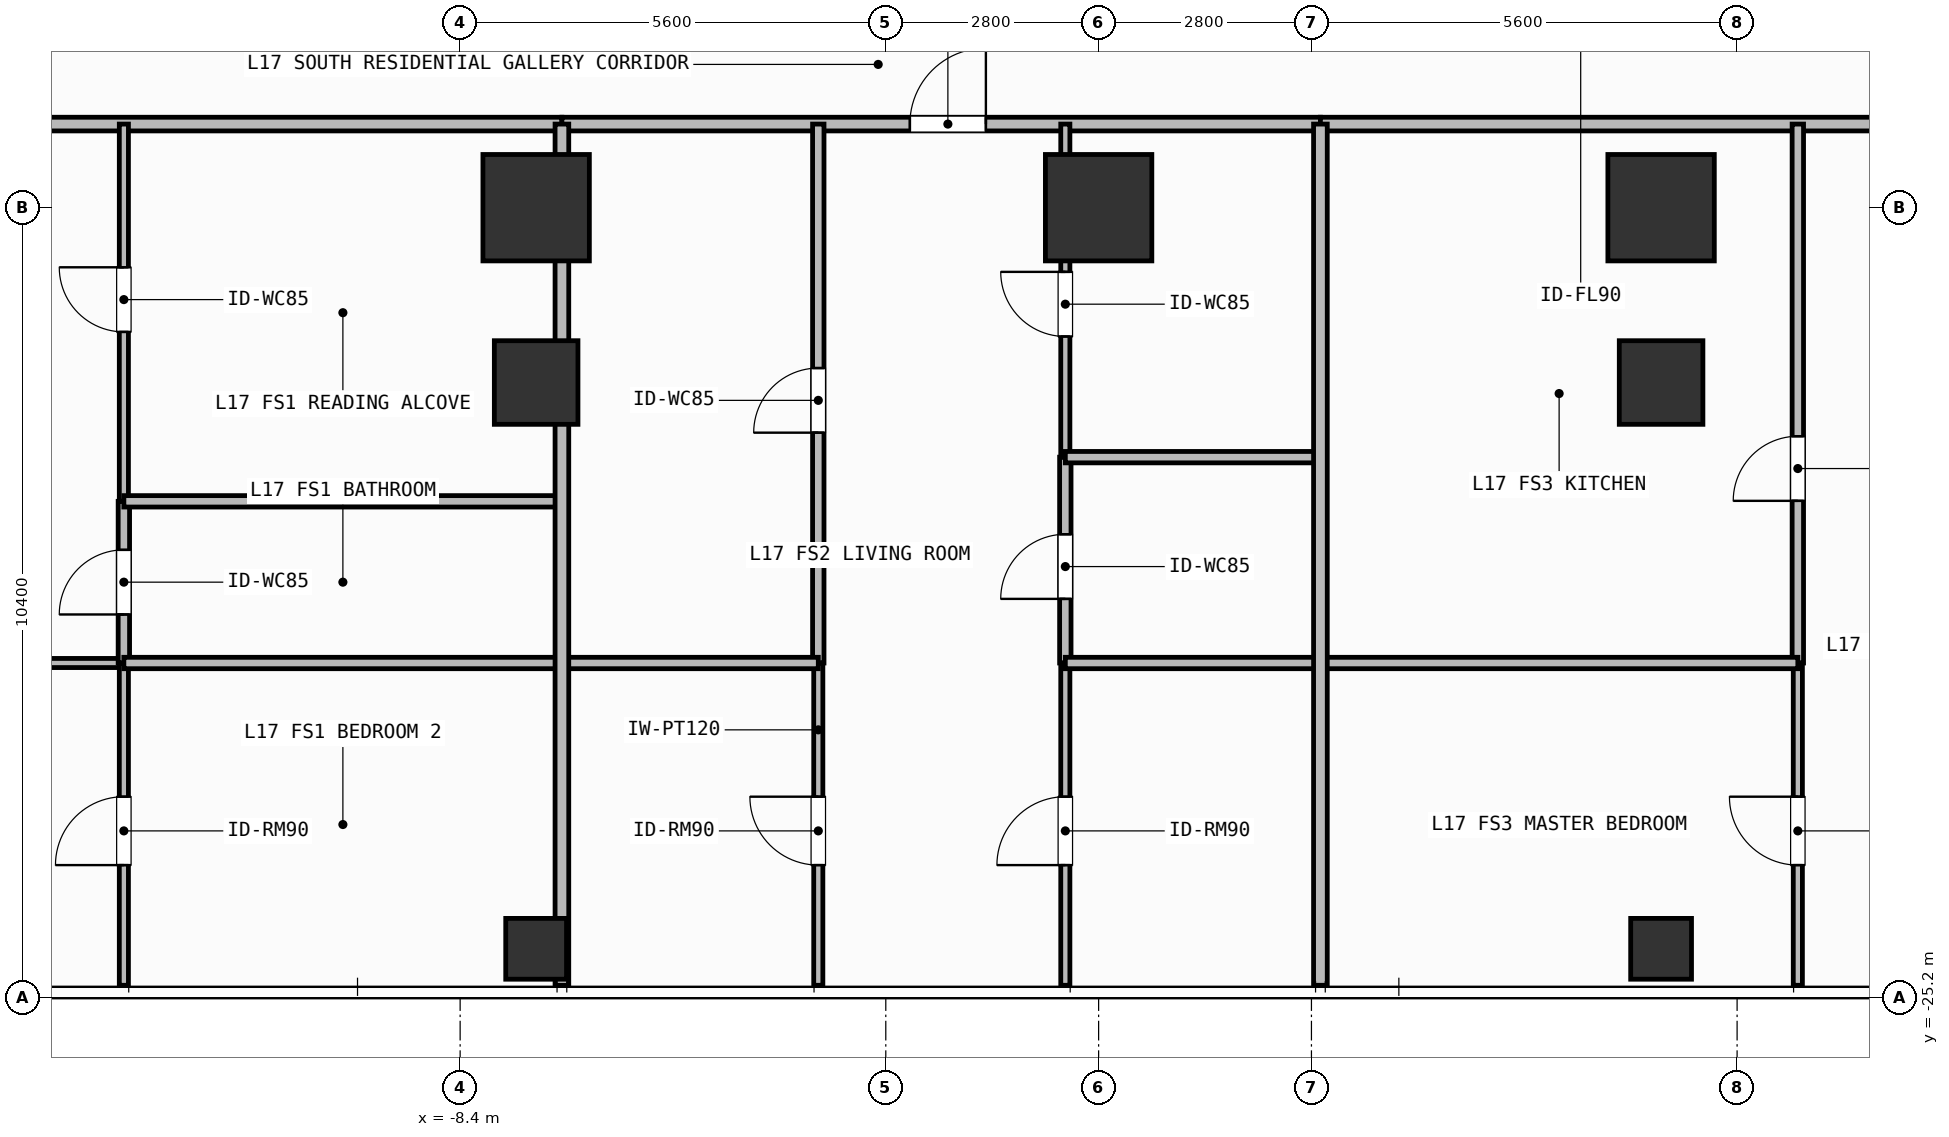
"""IFC4 building model, lengths in metres.
Left out: names, types, materials, properties, quantities, classifications, styles, units other than length and angle.
Written with IfcOpenShell. Run it as: python <this file> out.ifc"""

import sys

from ifc_helpers import new_model, si_unit, direction, frame, frame_2d, origin, origin_2d, place, context, subcontext, project, spatial, rectangle, hollow_rectangle, extrude, element, fill, save


model = new_model("IFC4")
c1 = context("Model", 3, precision=1e-05, world=origin(), true_north=direction((0.0, 1.0)))
c2 = subcontext(c1, "Body", "Model", "MODEL_VIEW")
j1 = project(units=[si_unit("LENGTHUNIT", "METRE"), si_unit("PLANEANGLEUNIT", "RADIAN")], contexts=[c1])
p1 = place(None, origin())
s1 = spatial("IfcSite", under=j1, at=p1, CompositionType="ELEMENT")
p2 = place(p1, origin())
s2 = spatial("IfcBuilding", under=s1, at=p2, CompositionType="ELEMENT")
p3 = place(p2, frame((0.0, 0.0, 65.7)))
s3 = spatial("IfcBuildingStorey", under=s2, at=p3, CompositionType="ELEMENT", Elevation=65.7)
for number, where, z_axis, x_axis in (
    (1, (-7.4, -14.8, 0.0), (0.0, 0.0, 1.0), (1.0, 0.0, 0.0)),
    (2, (0.0, -14.8, 0.0), (0.0, 0.0, 1.0), (1.0, 0.0, 0.0)),
    (3, (7.4, -14.8, 0.0), (0.0, 0.0, 1.0), (1.0, 0.0, 0.0)),
):
    element("IfcColumn", number, at=place(p3, frame(where, z_axis=z_axis, x_axis=x_axis)), inside=s3, PredefinedType="COLUMN", context=c2, shape_type="SweptSolid", body=[
        extrude(rectangle(XDim=1.4, YDim=1.4, at=origin_2d()), origin(), (0.0, 0.0, 1.0), 3.9),
    ])
for number, where, z_axis, x_axis in (
    (4, (-7.4, -17.1, 0.0), (0.0, 0.0, 1.0), (1.0, 0.0, 0.0)),
    (5, (7.4, -17.1, 0.0), (0.0, 0.0, 1.0), (1.0, 0.0, 0.0)),
):
    element("IfcColumn", number, at=place(p3, frame(where, z_axis=z_axis, x_axis=x_axis)), inside=s3, PredefinedType="COLUMN", context=c2, shape_type="SweptSolid", body=[
        extrude(rectangle(XDim=1.1, YDim=1.1, at=origin_2d()), origin(), (0.0, 0.0, 1.0), 3.9),
    ])
for number, where, z_axis, x_axis in (
    (6, (-7.4, -24.55, 0.0), (0.0, 0.0, 1.0), (1.0, 0.0, 0.0)),
    (7, (7.4, -24.55, 0.0), (0.0, 0.0, 1.0), (1.0, 0.0, 0.0)),
):
    element("IfcColumn", number, at=place(p3, frame(where, z_axis=z_axis, x_axis=x_axis)), inside=s3, PredefinedType="COLUMN", context=c2, shape_type="SweptSolid", body=[
        extrude(hollow_rectangle(XDim=0.8, YDim=0.8, WallThickness=0.036, at=origin_2d()), origin(), (0.0, 0.0, 1.0), 3.9),
    ])
p4 = place(p3, frame((-24.42, -13.7, 0.0), z_axis=(0.0, 0.0, 1.0), x_axis=(1.0, 0.0, 0.0)))
e8 = element("IfcWall", 8, at=p4, inside=s3, PredefinedType="PARTITIONING", context=c2, shape_type="SweptSolid", body=[
    extrude(rectangle(XDim=17.359, YDim=0.18, at=frame_2d((8.679, 0.0))), origin(), (0.0, 0.0, 1.0), 3.68),
])
p5 = place(p4, frame((7.288, 0.0, 0.0)))
e9 = element("IfcOpeningElement", 9, at=p5, cuts=e8, PredefinedType="OPENING", context=c2, shape_type="SweptSolid", body=[
    extrude(rectangle(XDim=1.0, YDim=2.2, at=frame_2d((0.5, 1.1))), frame((0.0, 0.1, 0.0), z_axis=(0.0, -1.0, 0.0), x_axis=(1.0, 0.0, 0.0)), (0.0, 0.0, 1.0), 0.2),
])
p6 = place(p3, frame((-20.783, -20.79, 0.0), z_axis=(0.0, 0.0, 1.0), x_axis=(1.0, 0.0, 0.0)))
e10 = element("IfcWall", 10, at=p6, inside=s3, PredefinedType="PARTITIONING", context=c2, shape_type="SweptSolid", body=[
    extrude(rectangle(XDim=7.959, YDim=0.12, at=frame_2d((3.979, 0.0))), origin(), (0.0, 0.0, 1.0), 3.68),
])
p7 = place(p6, frame((3.53, 0.0, 0.0)))
e11 = element("IfcOpeningElement", 11, at=p7, cuts=e10, PredefinedType="OPENING", context=c2, shape_type="SweptSolid", body=[
    extrude(rectangle(XDim=0.9, YDim=2.1, at=frame_2d((0.45, 1.05))), frame((0.0, 0.07, 0.0), z_axis=(0.0, -1.0, 0.0), x_axis=(1.0, 0.0, 0.0)), (0.0, 0.0, 1.0), 0.14),
])
p8 = place(p3, frame((-12.824, -20.79, 0.0), z_axis=(0.0, 0.0, 1.0), x_axis=(0.0, 1.0, 0.0)))
e12 = element("IfcWall", 12, at=p8, inside=s3, PredefinedType="PARTITIONING", context=c2, shape_type="SweptSolid", body=[
    extrude(rectangle(XDim=2.127, YDim=0.15, at=frame_2d((1.063, 0.0))), origin(), (0.0, 0.0, 1.0), 3.68),
])
p9 = place(p8, frame((0.638, 0.0, 0.0)))
e13 = element("IfcOpeningElement", 13, at=p9, cuts=e12, PredefinedType="OPENING", context=c2, shape_type="SweptSolid", body=[
    extrude(rectangle(XDim=0.85, YDim=2.1, at=frame_2d((0.425, 1.05))), frame((0.0, 0.085, 0.0), z_axis=(0.0, -1.0, 0.0), x_axis=(1.0, 0.0, 0.0)), (0.0, 0.0, 1.0), 0.17),
])
p10 = place(p3, frame((-12.824, -18.663, 0.0), z_axis=(0.0, 0.0, 1.0), x_axis=(0.0, 1.0, 0.0)))
e14 = element("IfcWall", 14, at=p10, inside=s3, PredefinedType="PARTITIONING", context=c2, shape_type="SweptSolid", body=[
    extrude(rectangle(XDim=4.963, YDim=0.12, at=frame_2d((2.481, 0.0))), origin(), (0.0, 0.0, 1.0), 3.68),
])
p11 = place(p10, frame((2.229, 0.0, 0.0)))
e15 = element("IfcOpeningElement", 15, at=p11, cuts=e14, PredefinedType="OPENING", context=c2, shape_type="SweptSolid", body=[
    extrude(rectangle(XDim=0.85, YDim=2.1, at=frame_2d((0.425, 1.05))), frame((0.0, 0.07, 0.0), z_axis=(0.0, -1.0, 0.0), x_axis=(1.0, 0.0, 0.0)), (0.0, 0.0, 1.0), 0.14),
])
p12 = place(p3, frame((-12.824, -25.03, 0.0), z_axis=(0.0, 0.0, 1.0), x_axis=(0.0, 1.0, 0.0)))
e16 = element("IfcWall", 16, at=p12, inside=s3, PredefinedType="PARTITIONING", context=c2, shape_type="SweptSolid", body=[
    extrude(rectangle(XDim=4.24, YDim=0.12, at=frame_2d((2.12, 0.0))), origin(), (0.0, 0.0, 1.0), 3.68),
])
p13 = place(p12, frame((1.581, 0.0, 0.0)))
e17 = element("IfcOpeningElement", 17, at=p13, cuts=e16, PredefinedType="OPENING", context=c2, shape_type="SweptSolid", body=[
    extrude(rectangle(XDim=0.9, YDim=2.1, at=frame_2d((0.45, 1.05))), frame((0.0, 0.07, 0.0), z_axis=(0.0, -1.0, 0.0), x_axis=(1.0, 0.0, 0.0)), (0.0, 0.0, 1.0), 0.14),
])
p14 = place(p3, frame((-7.061, -13.7, 0.0), z_axis=(0.0, 0.0, 1.0), x_axis=(1.0, 0.0, 0.0)))
e18 = element("IfcWall", 18, at=p14, inside=s3, PredefinedType="PARTITIONING", context=c2, shape_type="SweptSolid", body=[
    extrude(rectangle(XDim=9.979, YDim=0.18, at=frame_2d((4.99, 0.0))), origin(), (0.0, 0.0, 1.0), 3.68),
])
p15 = place(p14, frame((4.578, 0.0, 0.0)))
e19 = element("IfcOpeningElement", 19, at=p15, cuts=e18, PredefinedType="OPENING", context=c2, shape_type="SweptSolid", body=[
    extrude(rectangle(XDim=1.0, YDim=2.2, at=frame_2d((0.5, 1.1))), frame((0.0, 0.1, 0.0), z_axis=(0.0, -1.0, 0.0), x_axis=(1.0, 0.0, 0.0)), (0.0, 0.0, 1.0), 0.2),
])
p16 = place(p3, frame((-3.688, -20.79, 0.0), z_axis=(0.0, 0.0, 1.0), x_axis=(0.0, 1.0, 0.0)))
e20 = element("IfcWall", 20, at=p16, inside=s3, PredefinedType="PARTITIONING", context=c2, shape_type="SweptSolid", body=[
    extrude(rectangle(XDim=7.09, YDim=0.15, at=frame_2d((3.545, 0.0))), origin(), (0.0, 0.0, 1.0), 3.68),
])
p17 = place(p16, frame((3.03, 0.0, 0.0)))
e21 = element("IfcOpeningElement", 21, at=p17, cuts=e20, PredefinedType="OPENING", context=c2, shape_type="SweptSolid", body=[
    extrude(rectangle(XDim=0.85, YDim=2.1, at=frame_2d((0.425, 1.05))), frame((0.0, 0.085, 0.0), z_axis=(0.0, -1.0, 0.0), x_axis=(1.0, 0.0, 0.0)), (0.0, 0.0, 1.0), 0.17),
])
p18 = place(p3, frame((-3.688, -25.03, 0.0), z_axis=(0.0, 0.0, 1.0), x_axis=(0.0, 1.0, 0.0)))
e22 = element("IfcWall", 22, at=p18, inside=s3, PredefinedType="PARTITIONING", context=c2, shape_type="SweptSolid", body=[
    extrude(rectangle(XDim=4.24, YDim=0.12, at=frame_2d((2.12, 0.0))), origin(), (0.0, 0.0, 1.0), 3.68),
])
p19 = place(p18, frame((1.581, 0.0, 0.0)))
e23 = element("IfcOpeningElement", 23, at=p19, cuts=e22, PredefinedType="OPENING", context=c2, shape_type="SweptSolid", body=[
    extrude(rectangle(XDim=0.9, YDim=2.1, at=frame_2d((0.45, 1.05))), frame((0.0, 0.07, 0.0), z_axis=(0.0, -1.0, 0.0), x_axis=(1.0, 0.0, 0.0)), (0.0, 0.0, 1.0), 0.14),
])
p20 = place(p3, frame((-0.438, -20.79, 0.0), z_axis=(0.0, 0.0, 1.0), x_axis=(0.0, 1.0, 0.0)))
e24 = element("IfcWall", 24, at=p20, inside=s3, PredefinedType="PARTITIONING", context=c2, shape_type="SweptSolid", body=[
    extrude(rectangle(XDim=2.708, YDim=0.15, at=frame_2d((1.354, 0.0))), origin(), (0.0, 0.0, 1.0), 3.68),
])
p21 = place(p20, frame((0.844, 0.0, 0.0)))
e25 = element("IfcOpeningElement", 25, at=p21, cuts=e24, PredefinedType="OPENING", context=c2, shape_type="SweptSolid", body=[
    extrude(rectangle(XDim=0.85, YDim=2.1, at=frame_2d((0.425, 1.05))), frame((0.0, 0.085, 0.0), z_axis=(0.0, -1.0, 0.0), x_axis=(1.0, 0.0, 0.0)), (0.0, 0.0, 1.0), 0.17),
])
p22 = place(p3, frame((-0.438, -18.082, 0.0), z_axis=(0.0, 0.0, 1.0), x_axis=(0.0, 1.0, 0.0)))
e26 = element("IfcWall", 26, at=p22, inside=s3, PredefinedType="PARTITIONING", context=c2, shape_type="SweptSolid", body=[
    extrude(rectangle(XDim=4.382, YDim=0.12, at=frame_2d((2.191, 0.0))), origin(), (0.0, 0.0, 1.0), 3.68),
])
p23 = place(p22, frame((1.588, 0.0, 0.0)))
e27 = element("IfcOpeningElement", 27, at=p23, cuts=e26, PredefinedType="OPENING", context=c2, shape_type="SweptSolid", body=[
    extrude(rectangle(XDim=0.85, YDim=2.1, at=frame_2d((0.425, 1.05))), frame((0.0, 0.07, 0.0), z_axis=(0.0, -1.0, 0.0), x_axis=(1.0, 0.0, 0.0)), (0.0, 0.0, 1.0), 0.14),
])
p24 = place(p3, frame((-0.438, -25.03, 0.0), z_axis=(0.0, 0.0, 1.0), x_axis=(0.0, 1.0, 0.0)))
e28 = element("IfcWall", 28, at=p24, inside=s3, PredefinedType="PARTITIONING", context=c2, shape_type="SweptSolid", body=[
    extrude(rectangle(XDim=4.24, YDim=0.12, at=frame_2d((2.12, 0.0))), origin(), (0.0, 0.0, 1.0), 3.68),
])
p25 = place(p24, frame((1.581, 0.0, 0.0)))
e29 = element("IfcOpeningElement", 29, at=p25, cuts=e28, PredefinedType="OPENING", context=c2, shape_type="SweptSolid", body=[
    extrude(rectangle(XDim=0.9, YDim=2.1, at=frame_2d((0.45, 1.05))), frame((0.0, 0.07, 0.0), z_axis=(0.0, -1.0, 0.0), x_axis=(1.0, 0.0, 0.0)), (0.0, 0.0, 1.0), 0.14),
])
p26 = place(p3, frame((2.918, -13.7, 0.0), z_axis=(0.0, 0.0, 1.0), x_axis=(1.0, 0.0, 0.0)))
e30 = element("IfcWall", 30, at=p26, inside=s3, PredefinedType="PARTITIONING", context=c2, shape_type="SweptSolid", body=[
    extrude(rectangle(XDim=15.702, YDim=0.18, at=frame_2d((7.851, 0.0))), origin(), (0.0, 0.0, 1.0), 3.68),
])
p27 = place(p26, frame((7.531, 0.0, 0.0)))
e31 = element("IfcOpeningElement", 31, at=p27, cuts=e30, PredefinedType="OPENING", context=c2, shape_type="SweptSolid", body=[
    extrude(rectangle(XDim=1.0, YDim=2.2, at=frame_2d((0.5, 1.1))), frame((0.0, 0.1, 0.0), z_axis=(0.0, -1.0, 0.0), x_axis=(1.0, 0.0, 0.0)), (0.0, 0.0, 1.0), 0.2),
])
p28 = place(p3, frame((9.199, -20.79, 0.0), z_axis=(0.0, 0.0, 1.0), x_axis=(0.0, 1.0, 0.0)))
e32 = element("IfcWall", 32, at=p28, inside=s3, PredefinedType="PARTITIONING", context=c2, shape_type="SweptSolid", body=[
    extrude(rectangle(XDim=7.09, YDim=0.15, at=frame_2d((3.545, 0.0))), origin(), (0.0, 0.0, 1.0), 3.68),
])
p29 = place(p28, frame((2.133, 0.0, 0.0)))
e33 = element("IfcOpeningElement", 33, at=p29, cuts=e32, PredefinedType="OPENING", context=c2, shape_type="SweptSolid", body=[
    extrude(rectangle(XDim=0.85, YDim=2.1, at=frame_2d((0.425, 1.05))), frame((0.0, 0.085, 0.0), z_axis=(0.0, -1.0, 0.0), x_axis=(1.0, 0.0, 0.0)), (0.0, 0.0, 1.0), 0.17),
])
p30 = place(p3, frame((9.199, -25.03, 0.0), z_axis=(0.0, 0.0, 1.0), x_axis=(0.0, 1.0, 0.0)))
e34 = element("IfcWall", 34, at=p30, inside=s3, PredefinedType="PARTITIONING", context=c2, shape_type="SweptSolid", body=[
    extrude(rectangle(XDim=4.24, YDim=0.12, at=frame_2d((2.12, 0.0))), origin(), (0.0, 0.0, 1.0), 3.68),
])
p31 = place(p30, frame((1.581, 0.0, 0.0)))
e35 = element("IfcOpeningElement", 35, at=p31, cuts=e34, PredefinedType="OPENING", context=c2, shape_type="SweptSolid", body=[
    extrude(rectangle(XDim=0.9, YDim=2.1, at=frame_2d((0.45, 1.05))), frame((0.0, 0.07, 0.0), z_axis=(0.0, -1.0, 0.0), x_axis=(1.0, 0.0, 0.0)), (0.0, 0.0, 1.0), 0.14),
])
for number, where, z_axis, x_axis in (
    (36, (-12.824, -18.663, 0.0), (0.0, 0.0, 1.0), (1.0, 0.0, 0.0)),
    (37, (-12.824, -20.79, 0.0), (0.0, 0.0, 1.0), (1.0, 0.0, 0.0)),
):
    element("IfcWall", number, at=place(p3, frame(where, z_axis=z_axis, x_axis=x_axis)), inside=s3, PredefinedType="PARTITIONING", context=c2, shape_type="SweptSolid", body=[
        extrude(rectangle(XDim=5.763, YDim=0.15, at=frame_2d((2.881, 0.0))), origin(), (0.0, 0.0, 1.0), 3.68),
    ])
p32 = place(p3, frame((-7.061, -20.79, 0.0), z_axis=(0.0, 0.0, 1.0), x_axis=(1.0, 0.0, 0.0)))
e38 = element("IfcWall", 38, at=p32, inside=s3, PredefinedType="PARTITIONING", context=c2, shape_type="SweptSolid", body=[
    extrude(rectangle(XDim=3.373, YDim=0.15, at=frame_2d((1.687, 0.0))), origin(), (0.0, 0.0, 1.0), 3.68),
])
for number, where, z_axis, x_axis in (
    (39, (-0.438, -18.082, 0.0), (0.0, 0.0, 1.0), (1.0, 0.0, 0.0)),
    (40, (-0.438, -20.79, 0.0), (0.0, 0.0, 1.0), (1.0, 0.0, 0.0)),
):
    element("IfcWall", number, at=place(p3, frame(where, z_axis=z_axis, x_axis=x_axis)), inside=s3, PredefinedType="PARTITIONING", context=c2, shape_type="SweptSolid", body=[
        extrude(rectangle(XDim=3.356, YDim=0.15, at=frame_2d((1.678, 0.0))), origin(), (0.0, 0.0, 1.0), 3.68),
    ])
p33 = place(p3, frame((-7.061, -25.03, 0.0), z_axis=(0.0, 0.0, 1.0), x_axis=(0.0, 1.0, 0.0)))
e41 = element("IfcWall", 41, at=p33, inside=s3, PredefinedType="PARTITIONING", context=c2, shape_type="SweptSolid", body=[
    extrude(rectangle(XDim=11.33, YDim=0.18, at=frame_2d((5.665, 0.0))), origin(), (0.0, 0.0, 1.0), 3.68),
])
p34 = place(p3, frame((2.918, -20.79, 0.0), z_axis=(0.0, 0.0, 1.0), x_axis=(1.0, 0.0, 0.0)))
e42 = element("IfcWall", 42, at=p34, inside=s3, PredefinedType="PARTITIONING", context=c2, shape_type="SweptSolid", body=[
    extrude(rectangle(XDim=6.281, YDim=0.15, at=frame_2d((3.141, 0.0))), origin(), (0.0, 0.0, 1.0), 3.68),
])
p35 = place(p3, frame((2.918, -25.03, 0.0), z_axis=(0.0, 0.0, 1.0), x_axis=(0.0, 1.0, 0.0)))
e43 = element("IfcWall", 43, at=p35, inside=s3, PredefinedType="PARTITIONING", context=c2, shape_type="SweptSolid", body=[
    extrude(rectangle(XDim=11.33, YDim=0.18, at=frame_2d((5.665, 0.0))), origin(), (0.0, 0.0, 1.0), 3.68),
])
p36 = place(p9, origin())
e44 = element("IfcDoor", 44, at=p36, inside=s3, OperationType="SINGLE_SWING_LEFT", PredefinedType="DOOR", context=c2, shape_type="SweptSolid", body=[
    extrude(rectangle(XDim=0.85, YDim=2.1, at=frame_2d((0.425, 1.05))), frame((0.0, 0.025, 0.0), z_axis=(0.0, -1.0, 0.0), x_axis=(1.0, 0.0, 0.0)), (0.0, 0.0, 1.0), 0.05),
])
fill(e13, e44)
p37 = place(p11, origin())
e45 = element("IfcDoor", 45, at=p37, inside=s3, OperationType="SINGLE_SWING_RIGHT", PredefinedType="DOOR", context=c2, shape_type="SweptSolid", body=[
    extrude(rectangle(XDim=0.85, YDim=2.1, at=frame_2d((0.425, 1.05))), frame((0.0, 0.025, 0.0), z_axis=(0.0, -1.0, 0.0), x_axis=(1.0, 0.0, 0.0)), (0.0, 0.0, 1.0), 0.05),
])
fill(e15, e45)
p38 = place(p13, origin())
e46 = element("IfcDoor", 46, at=p38, inside=s3, OperationType="SINGLE_SWING_LEFT", PredefinedType="DOOR", context=c2, shape_type="SweptSolid", body=[
    extrude(rectangle(XDim=0.9, YDim=2.1, at=frame_2d((0.45, 1.05))), frame((0.0, 0.025, 0.0), z_axis=(0.0, -1.0, 0.0), x_axis=(1.0, 0.0, 0.0)), (0.0, 0.0, 1.0), 0.05),
])
fill(e17, e46)
p39 = place(p15, origin())
e47 = element("IfcDoor", 47, at=p39, inside=s3, OperationType="SINGLE_SWING_RIGHT", PredefinedType="DOOR", context=c2, shape_type="SweptSolid", body=[
    extrude(rectangle(XDim=1.0, YDim=2.2, at=frame_2d((0.5, 1.1))), frame((0.0, 0.025, 0.0), z_axis=(0.0, -1.0, 0.0), x_axis=(1.0, 0.0, 0.0)), (0.0, 0.0, 1.0), 0.05),
])
fill(e19, e47)
p40 = place(p17, origin())
e48 = element("IfcDoor", 48, at=p40, inside=s3, OperationType="SINGLE_SWING_LEFT", PredefinedType="DOOR", context=c2, shape_type="SweptSolid", body=[
    extrude(rectangle(XDim=0.85, YDim=2.1, at=frame_2d((0.425, 1.05))), frame((0.0, 0.025, 0.0), z_axis=(0.0, -1.0, 0.0), x_axis=(1.0, 0.0, 0.0)), (0.0, 0.0, 1.0), 0.05),
])
fill(e21, e48)
p41 = place(p19, origin())
e49 = element("IfcDoor", 49, at=p41, inside=s3, OperationType="SINGLE_SWING_RIGHT", PredefinedType="DOOR", context=c2, shape_type="SweptSolid", body=[
    extrude(rectangle(XDim=0.9, YDim=2.1, at=frame_2d((0.45, 1.05))), frame((0.0, 0.025, 0.0), z_axis=(0.0, -1.0, 0.0), x_axis=(1.0, 0.0, 0.0)), (0.0, 0.0, 1.0), 0.05),
])
fill(e23, e49)
p42 = place(p21, origin())
e50 = element("IfcDoor", 50, at=p42, inside=s3, OperationType="SINGLE_SWING_LEFT", PredefinedType="DOOR", context=c2, shape_type="SweptSolid", body=[
    extrude(rectangle(XDim=0.85, YDim=2.1, at=frame_2d((0.425, 1.05))), frame((0.0, 0.025, 0.0), z_axis=(0.0, -1.0, 0.0), x_axis=(1.0, 0.0, 0.0)), (0.0, 0.0, 1.0), 0.05),
])
fill(e25, e50)
p43 = place(p23, origin())
e51 = element("IfcDoor", 51, at=p43, inside=s3, OperationType="SINGLE_SWING_RIGHT", PredefinedType="DOOR", context=c2, shape_type="SweptSolid", body=[
    extrude(rectangle(XDim=0.85, YDim=2.1, at=frame_2d((0.425, 1.05))), frame((0.0, 0.025, 0.0), z_axis=(0.0, -1.0, 0.0), x_axis=(1.0, 0.0, 0.0)), (0.0, 0.0, 1.0), 0.05),
])
fill(e27, e51)
p44 = place(p25, origin())
e52 = element("IfcDoor", 52, at=p44, inside=s3, OperationType="SINGLE_SWING_LEFT", PredefinedType="DOOR", context=c2, shape_type="SweptSolid", body=[
    extrude(rectangle(XDim=0.9, YDim=2.1, at=frame_2d((0.45, 1.05))), frame((0.0, 0.025, 0.0), z_axis=(0.0, -1.0, 0.0), x_axis=(1.0, 0.0, 0.0)), (0.0, 0.0, 1.0), 0.05),
])
fill(e29, e52)
p45 = place(p29, origin())
e53 = element("IfcDoor", 53, at=p45, inside=s3, OperationType="SINGLE_SWING_LEFT", PredefinedType="DOOR", context=c2, shape_type="SweptSolid", body=[
    extrude(rectangle(XDim=0.85, YDim=2.1, at=frame_2d((0.425, 1.05))), frame((0.0, 0.025, 0.0), z_axis=(0.0, -1.0, 0.0), x_axis=(1.0, 0.0, 0.0)), (0.0, 0.0, 1.0), 0.05),
])
fill(e33, e53)
p46 = place(p31, origin())
e54 = element("IfcDoor", 54, at=p46, inside=s3, OperationType="SINGLE_SWING_RIGHT", PredefinedType="DOOR", context=c2, shape_type="SweptSolid", body=[
    extrude(rectangle(XDim=0.9, YDim=2.1, at=frame_2d((0.45, 1.05))), frame((0.0, 0.025, 0.0), z_axis=(0.0, -1.0, 0.0), x_axis=(1.0, 0.0, 0.0)), (0.0, 0.0, 1.0), 0.05),
])
fill(e35, e54)
save(model, sys.argv[1])
